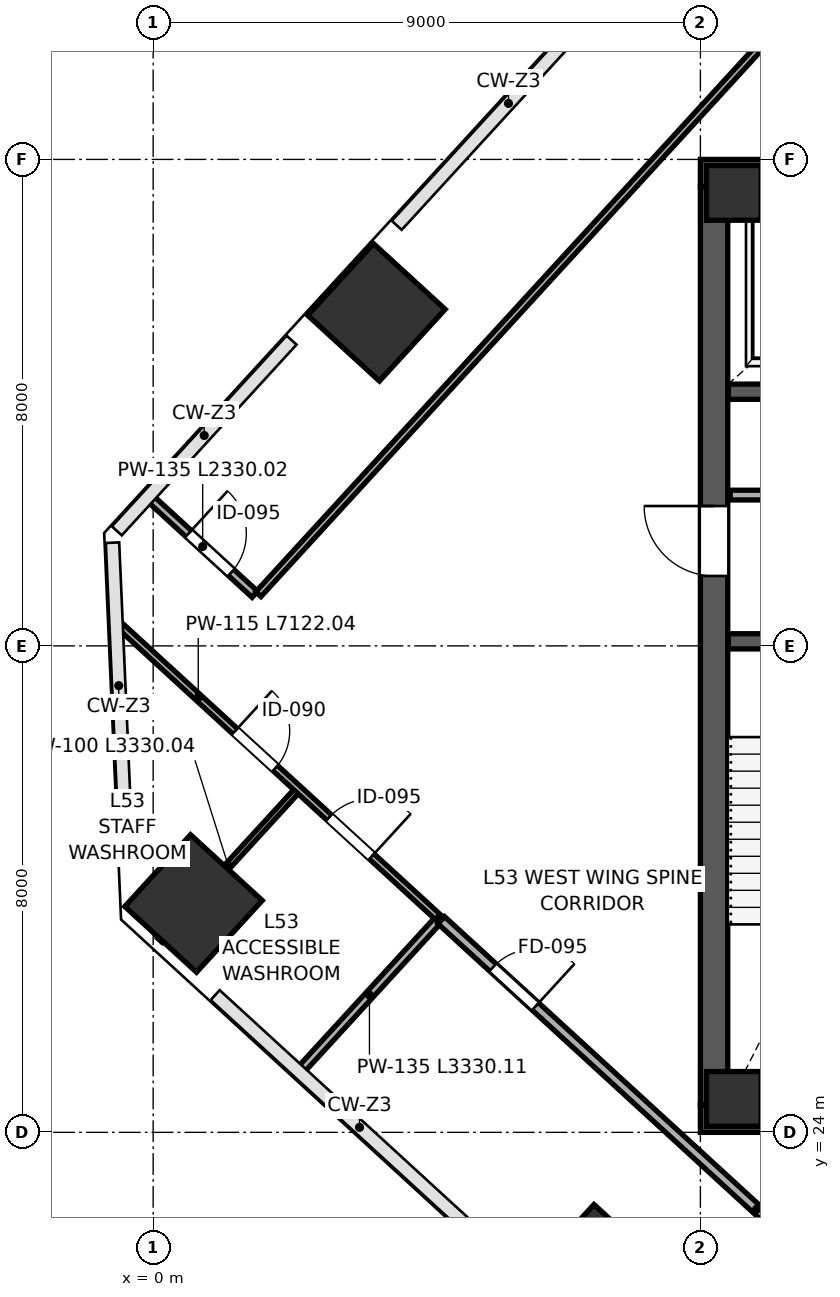
"""IFC4 building model, lengths in metres.
Left out: names, types, materials, properties, quantities, classifications, styles, units other than length and angle.
Written with IfcOpenShell. Run it as: python <this file> out.ifc"""

import sys

from ifc_helpers import new_model, si_unit, direction, frame, frame_2d, origin, origin_2d, place, context, subcontext, project, spatial, rectangle, extrude, source, transform, mapped, element, fill, save


model = new_model("IFC4")
c1 = context("Model", 3, precision=1e-05, world=origin(), true_north=direction((0.0, 1.0)))
c2 = subcontext(c1, "Body", "Model", "MODEL_VIEW")
j1 = project(units=[si_unit("LENGTHUNIT", "METRE"), si_unit("PLANEANGLEUNIT", "RADIAN")], contexts=[c1])
p1 = place(None, origin())
s1 = spatial("IfcSite", under=j1, at=p1, CompositionType="ELEMENT")
p2 = place(p1, origin())
s2 = spatial("IfcBuilding", under=s1, at=p2, CompositionType="ELEMENT")
p3 = place(p2, frame((0.0, 0.0, 237.4)))
s3 = spatial("IfcBuildingStorey", under=s2, at=p3, CompositionType="ELEMENT", Elevation=237.4)
m1 = source(origin(), c2, "Body", "SweptSolid", [
    extrude(rectangle(XDim=0.9, YDim=0.9, at=origin_2d()), origin(), (0.0, 0.0, 1.0), 4.199),
])
for number, where, z_axis, x_axis in (
    (1, (9.55, 24.55, 0.001), (0.0, 0.0, 1.0), (1.0, 0.0, 0.0)),
    (2, (9.55, 39.45, 0.001), (0.0, 0.0, 1.0), (1.0, 0.0, 0.0)),
):
    element("IfcColumn", number, at=place(p3, frame(where, z_axis=z_axis, x_axis=x_axis)), inside=s3, PredefinedType="COLUMN", context=c2, shape_type="MappedRepresentation", body=[
        mapped(m1, transform((0.0, 0.0, 0.0), scale=1.0)),
    ])
m2 = source(origin(), c2, "Body", "SweptSolid", [
    extrude(rectangle(XDim=1.6, YDim=1.6, at=origin_2d()), origin(), (0.0, 0.0, 1.0), 4.199),
])
for number, where, z_axis, x_axis in (
    (3, (0.664, 27.764, 0.001), (0.0, 0.0, 1.0), (-0.737, 0.676, 0.0)),
    (4, (7.299, 21.683, 0.001), (0.0, 0.0, 1.0), (-0.737, 0.676, 0.0)),
    (5, (3.672, 37.486, 0.001), (0.0, 0.0, 1.0), (-0.737, 0.676, 0.0)),
):
    element("IfcColumn", number, at=place(p3, frame(where, z_axis=z_axis, x_axis=x_axis)), inside=s3, PredefinedType="COLUMN", context=c2, shape_type="MappedRepresentation", body=[
        mapped(m2, transform((0.0, 0.0, 0.0), scale=1.0)),
    ])
p4 = place(p3, frame((9.225, 24.45, 0.0), z_axis=(0.0, 0.0, 1.0), x_axis=(0.0, 1.0, 0.0)))
e6 = element("IfcWall", 6, at=p4, inside=s3, PredefinedType="SHEAR", context=c2, shape_type="SweptSolid", body=[
    extrude(rectangle(XDim=15.1, YDim=0.45, at=frame_2d((7.55, 0.0))), origin(), (0.0, 0.0, 1.0), 3.96),
])
p5 = place(p4, frame((8.7, 0.0, 0.0)))
e7 = element("IfcOpeningElement", 7, at=p5, cuts=e6, PredefinedType="OPENING", context=c2, shape_type="SweptSolid", body=[
    extrude(rectangle(XDim=1.15, YDim=2.2, at=frame_2d((0.575, 1.1))), frame((0.0, 0.235, 0.0), z_axis=(0.0, -1.0, 0.0), x_axis=(1.0, 0.0, 0.0)), (0.0, 0.0, 1.0), 0.47),
])
for number, where, z_axis, x_axis in (
    (8, (9.0, 24.225, 0.0), (0.0, 0.0, 1.0), (1.0, 0.0, 0.0)),
    (9, (9.0, 39.775, 0.0), (0.0, 0.0, 1.0), (1.0, 0.0, 0.0)),
):
    element("IfcWall", number, at=place(p3, frame(where, z_axis=z_axis, x_axis=x_axis)), inside=s3, PredefinedType="SHEAR", context=c2, shape_type="SweptSolid", body=[
        extrude(rectangle(XDim=18.0, YDim=0.45, at=frame_2d((9.0, 0.0))), origin(), (0.0, 0.0, 1.0), 3.96),
    ])
p6 = place(p3, frame((9.46, 32.075, 0.0), z_axis=(0.0, 0.0, 1.0), x_axis=(1.0, 0.0, 0.0)))
e10 = element("IfcWall", 10, at=p6, inside=s3, PredefinedType="SHEAR", context=c2, shape_type="SweptSolid", body=[
    extrude(rectangle(XDim=3.29, YDim=0.25, at=frame_2d((1.645, 0.0))), origin(), (0.0, 0.0, 1.0), 3.96),
])
p7 = place(p3, frame((9.46, 36.18, 0.0), z_axis=(0.0, 0.0, 1.0), x_axis=(1.0, 0.0, 0.0)))
e11 = element("IfcWall", 11, at=p7, inside=s3, PredefinedType="SHEAR", context=c2, shape_type="SweptSolid", body=[
    extrude(rectangle(XDim=3.79, YDim=0.25, at=frame_2d((1.895, 0.0))), origin(), (0.0, 0.0, 1.0), 3.96),
])
p8 = place(p7, frame((2.62, 0.0, 0.0)))
e12 = element("IfcOpeningElement", 12, at=p8, cuts=e11, PredefinedType="OPENING", context=c2, shape_type="SweptSolid", body=[
    extrude(rectangle(XDim=0.85, YDim=2.1, at=frame_2d((0.425, 1.05))), frame((0.0, 0.135, 0.0), z_axis=(0.0, -1.0, 0.0), x_axis=(1.0, 0.0, 0.0)), (0.0, 0.0, 1.0), 0.27),
])
p9 = place(p7, frame((0.85, 0.0, 0.0)))
e13 = element("IfcOpeningElement", 13, at=p9, cuts=e11, PredefinedType="OPENING", context=c2, shape_type="SweptSolid", body=[
    extrude(rectangle(XDim=1.3, YDim=2.25, at=frame_2d((0.65, 1.125))), frame((0.0, 0.135, 0.0), z_axis=(0.0, -1.0, 0.0), x_axis=(1.0, 0.0, 0.0)), (0.0, 0.0, 1.0), 0.27),
])
p10 = place(p3, frame((9.49, 34.48, 0.0), z_axis=(0.0, 0.0, 1.0), x_axis=(1.0, 0.0, 0.0)))
e14 = element("IfcWall", 14, at=p10, inside=s3, PredefinedType="PARTITIONING", context=c2, shape_type="SweptSolid", body=[
    extrude(rectangle(XDim=3.7, YDim=0.16, at=frame_2d((1.85, 0.0))), origin(), (0.0, 0.0, 1.0), 3.96),
])
p11 = place(p10, frame((1.15, 0.0, 0.0)))
e15 = element("IfcOpeningElement", 15, at=p11, cuts=e14, PredefinedType="OPENING", context=c2, shape_type="SweptSolid", body=[
    extrude(rectangle(XDim=0.9, YDim=2.15, at=frame_2d((0.45, 1.075))), frame((0.0, 0.09, 0.0), z_axis=(0.0, -1.0, 0.0), x_axis=(1.0, 0.0, 0.0)), (0.0, 0.0, 1.0), 0.18),
])
p12 = place(p3, frame((0.11, 27.159, 0.0), z_axis=(0.0, 0.0, 1.0), x_axis=(0.675605101048, 0.737263689217, 0.0)))
e16 = element("IfcWall", 16, at=p12, inside=s3, PredefinedType="PARTITIONING", context=c2, shape_type="SweptSolid", body=[
    extrude(rectangle(XDim=3.33, YDim=0.1, at=frame_2d((1.665, 0.0))), origin(), (0.0, 0.0, 1.0), 3.195),
])
p13 = place(p3, frame((2.432, 25.031, 0.0), z_axis=(0.0, 0.0, 1.0), x_axis=(0.675605101048, 0.737263689217, 0.0)))
e17 = element("IfcWall", 17, at=p13, inside=s3, PredefinedType="PARTITIONING", context=c2, shape_type="SweptSolid", body=[
    extrude(rectangle(XDim=3.33, YDim=0.135, at=frame_2d((1.665, 0.0))), origin(), (0.0, 0.0, 1.0), 3.195),
])
p14 = place(p3, frame((-0.571, 32.354, 0.0), z_axis=(0.0, 0.0, 1.0), x_axis=(0.737285035525, -0.675581805846, 0.0)))
e18 = element("IfcWall", 18, at=p14, inside=s3, PredefinedType="PARTITIONING", context=c2, shape_type="SweptSolid", body=[
    extrude(rectangle(XDim=7.122, YDim=0.115, at=frame_2d((3.561, 0.0))), origin(), (0.0, 0.0, 1.0), 3.96),
])
p15 = place(p14, frame((2.6, 0.0, 0.0)))
e19 = element("IfcOpeningElement", 19, at=p15, cuts=e18, PredefinedType="OPENING", context=c2, shape_type="SweptSolid", body=[
    extrude(rectangle(XDim=0.9, YDim=2.15, at=frame_2d((0.45, 1.075))), frame((0.0, 0.067, 0.0), z_axis=(0.0, -1.0, 0.0), x_axis=(1.0, 0.0, 0.0)), (0.0, 0.0, 1.0), 0.135),
])
p16 = place(p14, frame((4.7, 0.0, 0.0)))
e20 = element("IfcOpeningElement", 20, at=p16, cuts=e18, PredefinedType="OPENING", context=c2, shape_type="SweptSolid", body=[
    extrude(rectangle(XDim=0.95, YDim=2.15, at=frame_2d((0.475, 1.075))), frame((0.0, 0.067, 0.0), z_axis=(0.0, -1.0, 0.0), x_axis=(1.0, 0.0, 0.0)), (0.0, 0.0, 1.0), 0.135),
])
p17 = place(p3, frame((4.739, 27.489, 0.0), z_axis=(0.0, 0.0, 1.0), x_axis=(0.737276572642, -0.675591041558, 0.0)))
e21 = element("IfcWall", 21, at=p17, inside=s3, PredefinedType="PARTITIONING", context=c2, shape_type="SweptSolid", body=[
    extrude(rectangle(XDim=14.07, YDim=0.16, at=frame_2d((7.035, 0.0))), origin(), (0.0, 0.0, 1.0), 3.96),
])
p18 = place(p17, frame((1.15, 0.0, 0.0)))
e22 = element("IfcOpeningElement", 22, at=p18, cuts=e21, PredefinedType="OPENING", context=c2, shape_type="SweptSolid", body=[
    extrude(rectangle(XDim=0.95, YDim=2.15, at=frame_2d((0.475, 1.075))), frame((0.0, 0.09, 0.0), z_axis=(0.0, -1.0, 0.0), x_axis=(1.0, 0.0, 0.0)), (0.0, 0.0, 1.0), 0.18),
])
p19 = place(p3, frame((-0.044, 34.421, 0.0), z_axis=(0.0, 0.0, 1.0), x_axis=(0.73728894688, -0.675577537229, 0.0)))
e23 = element("IfcWall", 23, at=p19, inside=s3, PredefinedType="PARTITIONING", context=c2, shape_type="SweptSolid", body=[
    extrude(rectangle(XDim=2.33, YDim=0.135, at=frame_2d((1.165, 0.0))), origin(), (0.0, 0.0, 1.0), 3.96),
])
p20 = place(p19, frame((0.85, 0.0, 0.0)))
e24 = element("IfcOpeningElement", 24, at=p20, cuts=e23, PredefinedType="OPENING", context=c2, shape_type="SweptSolid", body=[
    extrude(rectangle(XDim=0.95, YDim=2.15, at=frame_2d((0.475, 1.075))), frame((0.0, 0.078, 0.0), z_axis=(0.0, -1.0, 0.0), x_axis=(1.0, 0.0, 0.0)), (0.0, 0.0, 1.0), 0.155),
])
p21 = place(p3, frame((1.73, 32.85, 0.0), z_axis=(0.0, 0.0, 1.0), x_axis=(0.675589845589, 0.737277668546, 0.0)))
e25 = element("IfcWall", 25, at=p21, inside=s3, PredefinedType="PARTITIONING", context=c2, shape_type="SweptSolid", body=[
    extrude(rectangle(XDim=26.742, YDim=0.115, at=frame_2d((13.371, 0.0))), origin(), (0.0, 0.0, 1.0), 3.96),
])
m3 = source(origin(), c2, "Body", "SweptSolid", [
    extrude(rectangle(XDim=1.15, YDim=2.2, at=frame_2d((0.575, 1.1))), frame((0.0, 0.025, 0.0), z_axis=(0.0, -1.0, 0.0), x_axis=(1.0, 0.0, 0.0)), (0.0, 0.0, 1.0), 0.05),
])
p22 = place(p5, origin())
e26 = element("IfcDoor", 26, at=p22, inside=s3, OperationType="SINGLE_SWING_RIGHT", PredefinedType="DOOR", context=c2, shape_type="MappedRepresentation", body=[
    mapped(m3, transform((0.0, 0.0, 0.0), scale=1.0)),
])
fill(e7, e26)
m4 = source(origin(), c2, "Body", "SweptSolid", [
    extrude(rectangle(XDim=0.9, YDim=2.15, at=frame_2d((0.45, 1.075))), frame((0.0, 0.025, 0.0), z_axis=(0.0, -1.0, 0.0), x_axis=(1.0, 0.0, 0.0)), (0.0, 0.0, 1.0), 0.05),
])
p23 = place(p15, origin())
e27 = element("IfcDoor", 27, at=p23, inside=s3, OperationType="SINGLE_SWING_LEFT", PredefinedType="DOOR", context=c2, shape_type="MappedRepresentation", body=[
    mapped(m4, transform((0.0, 0.0, 0.0), scale=1.0)),
])
fill(e19, e27)
m5 = source(origin(), c2, "Body", "SweptSolid", [
    extrude(rectangle(XDim=0.95, YDim=2.15, at=frame_2d((0.475, 1.075))), frame((0.0, 0.025, 0.0), z_axis=(0.0, -1.0, 0.0), x_axis=(1.0, 0.0, 0.0)), (0.0, 0.0, 1.0), 0.05),
])
p24 = place(p16, origin())
e28 = element("IfcDoor", 28, at=p24, inside=s3, OperationType="SINGLE_SWING_RIGHT", PredefinedType="DOOR", context=c2, shape_type="MappedRepresentation", body=[
    mapped(m5, transform((0.0, 0.0, 0.0), scale=1.0)),
])
fill(e20, e28)
m6 = source(origin(), c2, "Body", "SweptSolid", [
    extrude(rectangle(XDim=0.95, YDim=2.15, at=frame_2d((0.475, 1.075))), frame((0.0, 0.025, 0.0), z_axis=(0.0, -1.0, 0.0), x_axis=(1.0, 0.0, 0.0)), (0.0, 0.0, 1.0), 0.05),
])
p25 = place(p18, origin())
e29 = element("IfcDoor", 29, at=p25, inside=s3, OperationType="SINGLE_SWING_RIGHT", PredefinedType="DOOR", context=c2, shape_type="MappedRepresentation", body=[
    mapped(m6, transform((0.0, 0.0, 0.0), scale=1.0)),
])
fill(e22, e29)
p26 = place(p20, origin())
e30 = element("IfcDoor", 30, at=p26, inside=s3, OperationType="SINGLE_SWING_LEFT", PredefinedType="DOOR", context=c2, shape_type="MappedRepresentation", body=[
    mapped(m5, transform((0.0, 0.0, 0.0), scale=1.0)),
])
fill(e24, e30)
save(model, sys.argv[1])
